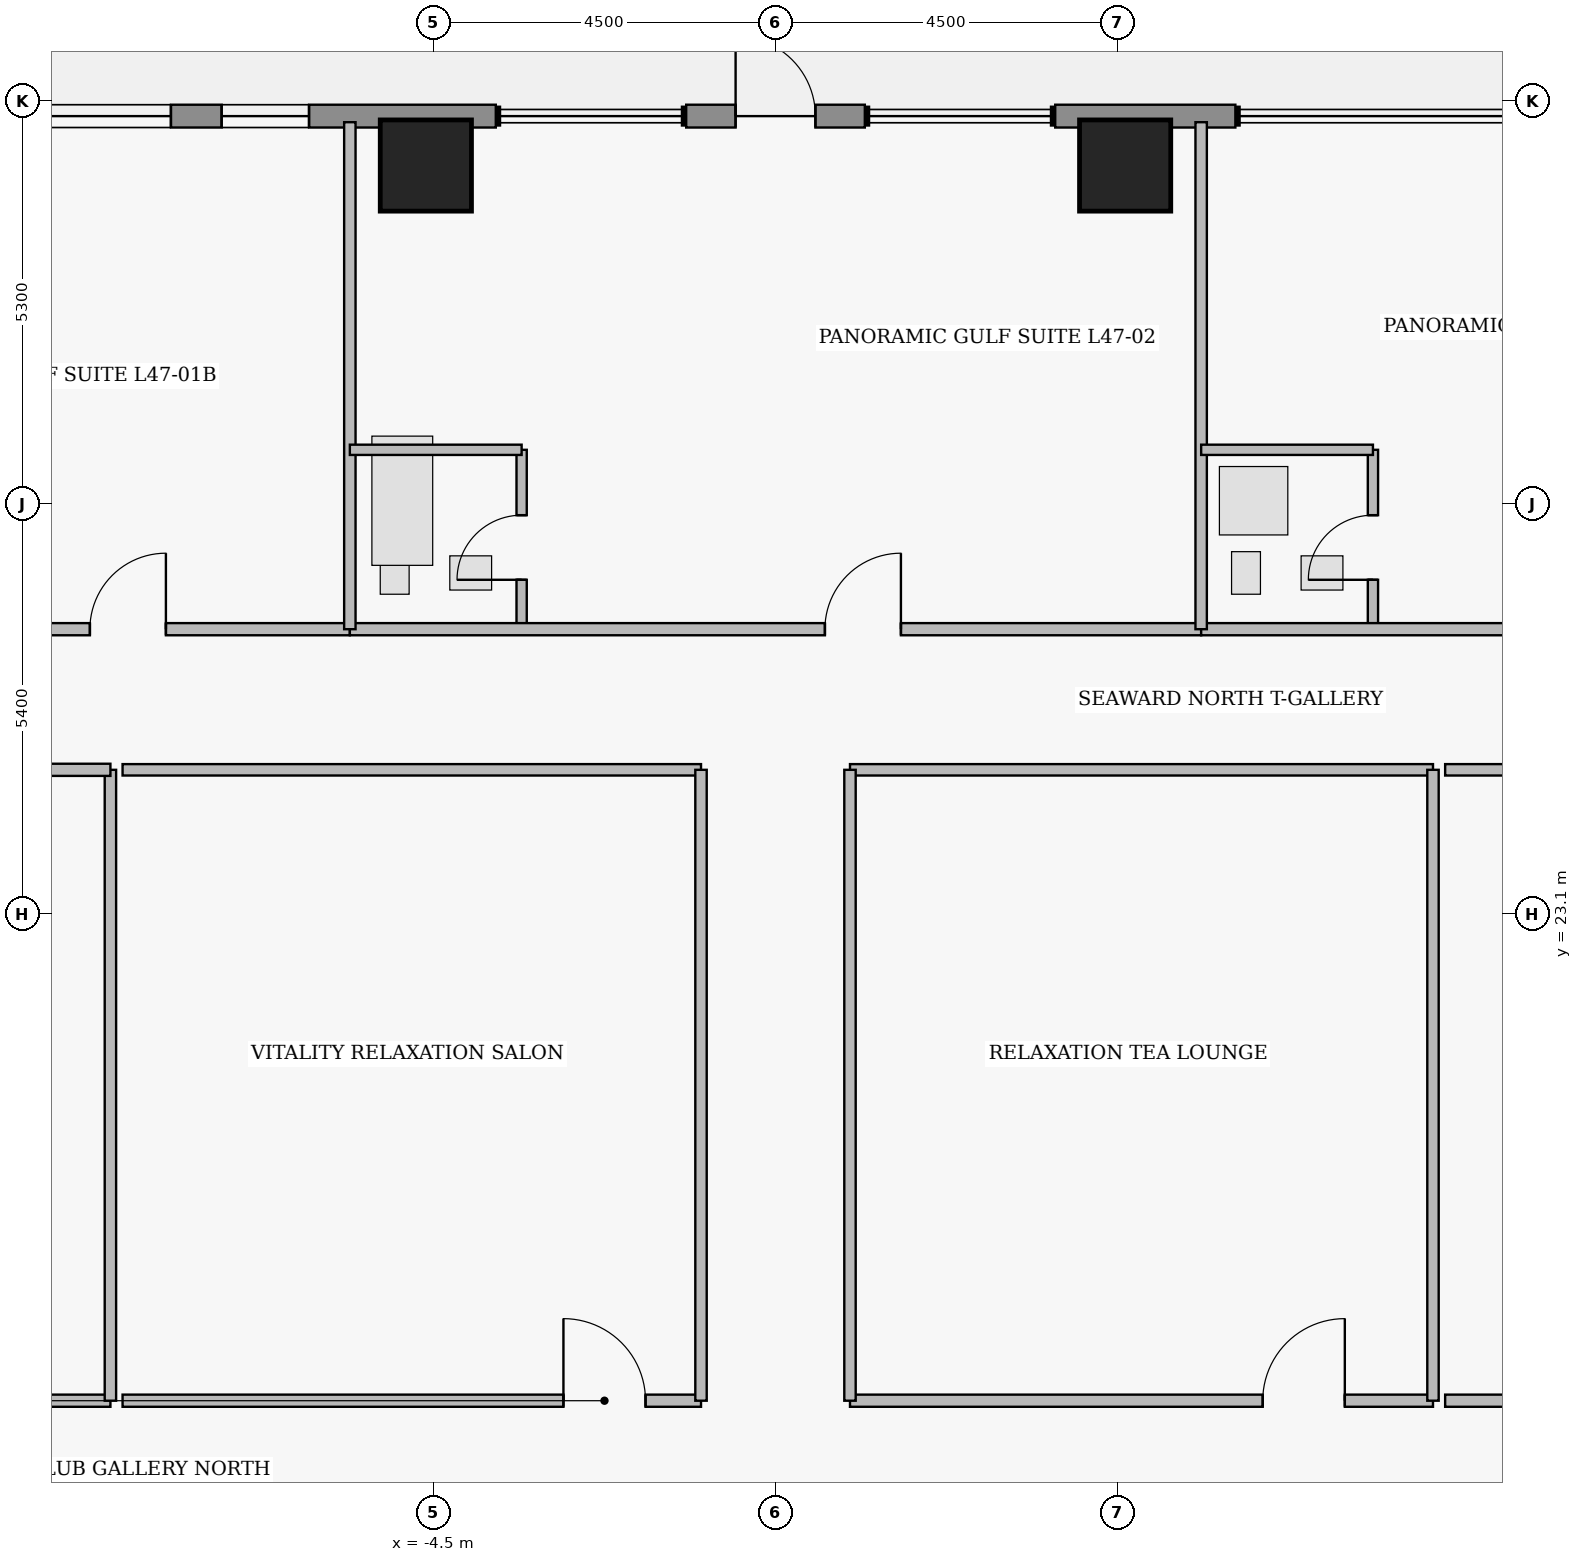
"""IFC4 building model, lengths in metres.
Left out: names, types, materials, properties, quantities, classifications, styles, units other than length and angle.
Written with IfcOpenShell. Run it as: python <this file> out.ifc"""

import sys

from ifc_helpers import new_model, si_unit, direction, frame, frame_2d, origin, origin_2d, place, context, subcontext, project, spatial, rectangle, extrude, element, fill, save


model = new_model("IFC4")
c1 = context("Model", 3, precision=1e-05, world=origin(), true_north=direction((0.0, 1.0)))
c2 = subcontext(c1, "Body", "Model", "MODEL_VIEW")
j1 = project(units=[si_unit("LENGTHUNIT", "METRE"), si_unit("PLANEANGLEUNIT", "RADIAN")], contexts=[c1])
p1 = place(None, origin())
s1 = spatial("IfcSite", under=j1, at=p1, CompositionType="ELEMENT")
p2 = place(p1, origin())
s2 = spatial("IfcBuilding", under=s1, at=p2, CompositionType="ELEMENT")
p3 = place(p2, frame((0.0, 0.0, 188.65)))
s3 = spatial("IfcBuildingStorey", under=s2, at=p3, CompositionType="ELEMENT", Elevation=188.65)
for number, where, z_axis, x_axis in (
    (1, (-4.6, 32.95, 0.0), (0.0, 0.0, 1.0), (1.0, 0.0, 0.0)),
    (2, (4.6, 32.95, 0.0), (0.0, 0.0, 1.0), (1.0, 0.0, 0.0)),
):
    element("IfcColumn", number, at=place(p3, frame(where, z_axis=z_axis, x_axis=x_axis)), inside=s3, PredefinedType="COLUMN", context=c2, shape_type="SweptSolid", body=[
        extrude(rectangle(XDim=1.2, YDim=1.2, at=origin_2d()), origin(), (0.0, 0.0, 1.0), 3.75),
    ])
p4 = place(p3, frame((-10.104, 33.6, 0.0), z_axis=(0.0, 0.0, 1.0), x_axis=(1.0, 0.0, 0.0)))
e3 = element("IfcWall", 3, at=p4, inside=s3, PredefinedType="STANDARD", context=c2, shape_type="SweptSolid", body=[
    extrude(rectangle(XDim=6.424, YDim=0.3, at=frame_2d((3.212, 0.0))), origin(), (0.0, 0.0, 1.0), 3.53),
])
p5 = place(p4, frame((0.55, 0.0, 0.85)))
e4 = element("IfcOpeningElement", 4, at=p5, cuts=e3, PredefinedType="OPENING", context=c2, shape_type="SweptSolid", body=[
    extrude(rectangle(XDim=1.6, YDim=1.8, at=frame_2d((0.8, 0.9))), frame((0.0, 0.16, 0.0), z_axis=(0.0, -1.0, 0.0), x_axis=(1.0, 0.0, 0.0)), (0.0, 0.0, 1.0), 0.32),
])
p6 = place(p4, frame((2.817, 0.0, 0.95)))
e5 = element("IfcOpeningElement", 5, at=p6, cuts=e3, PredefinedType="OPENING", context=c2, shape_type="SweptSolid", body=[
    extrude(rectangle(XDim=1.15, YDim=1.55, at=frame_2d((0.575, 0.775))), frame((0.0, 0.16, 0.0), z_axis=(0.0, -1.0, 0.0), x_axis=(1.0, 0.0, 0.0)), (0.0, 0.0, 1.0), 0.32),
])
p7 = place(p3, frame((-1.175, 33.6, 0.0), z_axis=(0.0, 0.0, 1.0), x_axis=(1.0, 0.0, 0.0)))
e6 = element("IfcWall", 6, at=p7, inside=s3, PredefinedType="STANDARD", context=c2, shape_type="SweptSolid", body=[
    extrude(rectangle(XDim=2.35, YDim=0.3, at=frame_2d((1.175, 0.0))), origin(), (0.0, 0.0, 1.0), 3.53),
])
p8 = place(p7, frame((0.65, 0.0, 0.0)))
e7 = element("IfcOpeningElement", 7, at=p8, cuts=e6, PredefinedType="OPENING", context=c2, shape_type="SweptSolid", body=[
    extrude(rectangle(XDim=1.05, YDim=2.2, at=frame_2d((0.525, 1.1))), frame((0.0, 0.16, 0.0), z_axis=(0.0, -1.0, 0.0), x_axis=(1.0, 0.0, 0.0)), (0.0, 0.0, 1.0), 0.32),
])
p9 = place(p3, frame((3.68, 33.6, 0.0), z_axis=(0.0, 0.0, 1.0), x_axis=(1.0, 0.0, 0.0)))
e8 = element("IfcWall", 8, at=p9, inside=s3, PredefinedType="STANDARD", context=c2, shape_type="SweptSolid", body=[
    extrude(rectangle(XDim=2.37, YDim=0.3, at=frame_2d((1.185, 0.0))), origin(), (0.0, 0.0, 1.0), 3.53),
])
p10 = place(p3, frame((-13.74, 26.85, 0.0), z_axis=(0.0, 0.0, 1.0), x_axis=(1.0, 0.0, 0.0)))
e9 = element("IfcWall", 9, at=p10, inside=s3, PredefinedType="PARTITIONING", context=c2, shape_type="SweptSolid", body=[
    extrude(rectangle(XDim=8.14, YDim=0.16, at=frame_2d((4.07, 0.0))), origin(), (0.0, 0.0, 1.0), 3.53),
])
p11 = place(p10, frame((4.72, 0.0, 0.0)))
e10 = element("IfcOpeningElement", 10, at=p11, cuts=e9, PredefinedType="OPENING", context=c2, shape_type="SweptSolid", body=[
    extrude(rectangle(XDim=1.0, YDim=2.15, at=frame_2d((0.5, 1.075))), frame((0.0, 0.09, 0.0), z_axis=(0.0, -1.0, 0.0), x_axis=(1.0, 0.0, 0.0)), (0.0, 0.0, 1.0), 0.18),
])
p12 = place(p3, frame((-3.34, 26.85, 0.0), z_axis=(0.0, 0.0, 1.0), x_axis=(0.0, 1.0, 0.0)))
e11 = element("IfcWall", 11, at=p12, inside=s3, PredefinedType="PLUMBINGWALL", context=c2, shape_type="SweptSolid", body=[
    extrude(rectangle(XDim=2.36, YDim=0.135, at=frame_2d((1.18, 0.0))), origin(), (0.0, 0.0, 1.0), 3.53),
])
p13 = place(p12, frame((0.65, 0.0, 0.0)))
e12 = element("IfcOpeningElement", 12, at=p13, cuts=e11, PredefinedType="OPENING", context=c2, shape_type="SweptSolid", body=[
    extrude(rectangle(XDim=0.85, YDim=2.1, at=frame_2d((0.425, 1.05))), frame((0.0, 0.077, 0.0), z_axis=(0.0, -1.0, 0.0), x_axis=(1.0, 0.0, 0.0)), (0.0, 0.0, 1.0), 0.155),
])
p14 = place(p3, frame((-5.6, 26.85, 0.0), z_axis=(0.0, 0.0, 1.0), x_axis=(1.0, 0.0, 0.0)))
e13 = element("IfcWall", 13, at=p14, inside=s3, PredefinedType="PARTITIONING", context=c2, shape_type="SweptSolid", body=[
    extrude(rectangle(XDim=11.2, YDim=0.16, at=frame_2d((5.6, 0.0))), origin(), (0.0, 0.0, 1.0), 3.53),
])
p15 = place(p14, frame((6.25, 0.0, 0.0)))
e14 = element("IfcOpeningElement", 14, at=p15, cuts=e13, PredefinedType="OPENING", context=c2, shape_type="SweptSolid", body=[
    extrude(rectangle(XDim=1.0, YDim=2.15, at=frame_2d((0.5, 1.075))), frame((0.0, 0.09, 0.0), z_axis=(0.0, -1.0, 0.0), x_axis=(1.0, 0.0, 0.0)), (0.0, 0.0, 1.0), 0.18),
])
p16 = place(p3, frame((7.86, 26.85, 0.0), z_axis=(0.0, 0.0, 1.0), x_axis=(0.0, 1.0, 0.0)))
e15 = element("IfcWall", 15, at=p16, inside=s3, PredefinedType="PLUMBINGWALL", context=c2, shape_type="SweptSolid", body=[
    extrude(rectangle(XDim=2.36, YDim=0.135, at=frame_2d((1.18, 0.0))), origin(), (0.0, 0.0, 1.0), 3.53),
])
p17 = place(p16, frame((0.65, 0.0, 0.0)))
e16 = element("IfcOpeningElement", 16, at=p17, cuts=e15, PredefinedType="OPENING", context=c2, shape_type="SweptSolid", body=[
    extrude(rectangle(XDim=0.85, YDim=2.1, at=frame_2d((0.425, 1.05))), frame((0.0, 0.077, 0.0), z_axis=(0.0, -1.0, 0.0), x_axis=(1.0, 0.0, 0.0)), (0.0, 0.0, 1.0), 0.155),
])
p18 = place(p3, frame((5.6, 26.85, 0.0), z_axis=(0.0, 0.0, 1.0), x_axis=(1.0, 0.0, 0.0)))
e17 = element("IfcWall", 17, at=p18, inside=s3, PredefinedType="PARTITIONING", context=c2, shape_type="SweptSolid", body=[
    extrude(rectangle(XDim=8.14, YDim=0.16, at=frame_2d((4.07, 0.0))), origin(), (0.0, 0.0, 1.0), 3.53),
])
p19 = place(p18, frame((4.72, 0.0, 0.0)))
e18 = element("IfcOpeningElement", 18, at=p19, cuts=e17, PredefinedType="OPENING", context=c2, shape_type="SweptSolid", body=[
    extrude(rectangle(XDim=1.0, YDim=2.15, at=frame_2d((0.5, 1.075))), frame((0.0, 0.09, 0.0), z_axis=(0.0, -1.0, 0.0), x_axis=(1.0, 0.0, 0.0)), (0.0, 0.0, 1.0), 0.18),
])
p20 = place(p3, frame((-22.04, 16.7, 0.0), z_axis=(0.0, 0.0, 1.0), x_axis=(1.0, 0.0, 0.0)))
e19 = element("IfcWall", 19, at=p20, inside=s3, PredefinedType="PARTITIONING", context=c2, shape_type="SweptSolid", body=[
    extrude(rectangle(XDim=13.29, YDim=0.16, at=frame_2d((6.645, 0.0))), origin(), (0.0, 0.0, 1.0), 3.124),
])
p21 = place(p20, frame((7.39, 0.0, 0.0)))
e20 = element("IfcOpeningElement", 20, at=p21, cuts=e19, PredefinedType="OPENING", context=c2, shape_type="SweptSolid", body=[
    extrude(rectangle(XDim=1.0, YDim=2.15, at=frame_2d((0.5, 1.075))), frame((0.0, 0.09, 0.0), z_axis=(0.0, -1.0, 0.0), x_axis=(1.0, 0.0, 0.0)), (0.0, 0.0, 1.0), 0.18),
])
p22 = place(p3, frame((-8.59, 16.7, 0.0), z_axis=(0.0, 0.0, 1.0), x_axis=(1.0, 0.0, 0.0)))
e21 = element("IfcWall", 21, at=p22, inside=s3, PredefinedType="PARTITIONING", context=c2, shape_type="SweptSolid", body=[
    extrude(rectangle(XDim=7.61, YDim=0.16, at=frame_2d((3.805, 0.0))), origin(), (0.0, 0.0, 1.0), 3.124),
])
p23 = place(p22, frame((5.8, 0.0, 0.0)))
e22 = element("IfcOpeningElement", 22, at=p23, cuts=e21, PredefinedType="OPENING", context=c2, shape_type="SweptSolid", body=[
    extrude(rectangle(XDim=1.08, YDim=2.18, at=frame_2d((0.54, 1.09))), frame((0.0, 0.09, 0.0), z_axis=(0.0, -1.0, 0.0), x_axis=(1.0, 0.0, 0.0)), (0.0, 0.0, 1.0), 0.18),
])
p24 = place(p3, frame((0.98, 16.7, 0.0), z_axis=(0.0, 0.0, 1.0), x_axis=(1.0, 0.0, 0.0)))
e23 = element("IfcWall", 23, at=p24, inside=s3, PredefinedType="PARTITIONING", context=c2, shape_type="SweptSolid", body=[
    extrude(rectangle(XDim=7.67, YDim=0.16, at=frame_2d((3.835, 0.0))), origin(), (0.0, 0.0, 1.0), 3.124),
])
p25 = place(p24, frame((5.43, 0.0, 0.0)))
e24 = element("IfcOpeningElement", 24, at=p25, cuts=e23, PredefinedType="OPENING", context=c2, shape_type="SweptSolid", body=[
    extrude(rectangle(XDim=1.08, YDim=2.18, at=frame_2d((0.54, 1.09))), frame((0.0, 0.09, 0.0), z_axis=(0.0, -1.0, 0.0), x_axis=(1.0, 0.0, 0.0)), (0.0, 0.0, 1.0), 0.18),
])
p26 = place(p3, frame((8.81, 16.7, 0.0), z_axis=(0.0, 0.0, 1.0), x_axis=(1.0, 0.0, 0.0)))
e25 = element("IfcWall", 25, at=p26, inside=s3, PredefinedType="PARTITIONING", context=c2, shape_type="SweptSolid", body=[
    extrude(rectangle(XDim=9.74, YDim=0.16, at=frame_2d((4.87, 0.0))), origin(), (0.0, 0.0, 1.0), 3.124),
])
p27 = place(p26, frame((6.8, 0.0, 0.0)))
e26 = element("IfcOpeningElement", 26, at=p27, cuts=e25, PredefinedType="OPENING", context=c2, shape_type="SweptSolid", body=[
    extrude(rectangle(XDim=1.08, YDim=2.18, at=frame_2d((0.54, 1.09))), frame((0.0, 0.09, 0.0), z_axis=(0.0, -1.0, 0.0), x_axis=(1.0, 0.0, 0.0)), (0.0, 0.0, 1.0), 0.18),
])
p28 = place(p3, frame((-5.6, 26.85, 0.0), z_axis=(0.0, 0.0, 1.0), x_axis=(0.0, 1.0, 0.0)))
e27 = element("IfcWall", 27, at=p28, inside=s3, PredefinedType="PARTITIONING", context=c2, shape_type="SweptSolid", body=[
    extrude(rectangle(XDim=6.67, YDim=0.15, at=frame_2d((3.335, 0.0))), origin(), (0.0, 0.0, 1.0), 3.53),
])
p29 = place(p3, frame((-5.6, 29.21, 0.0), z_axis=(0.0, 0.0, 1.0), x_axis=(1.0, 0.0, 0.0)))
e28 = element("IfcWall", 28, at=p29, inside=s3, PredefinedType="PLUMBINGWALL", context=c2, shape_type="SweptSolid", body=[
    extrude(rectangle(XDim=2.26, YDim=0.135, at=frame_2d((1.13, 0.0))), origin(), (0.0, 0.0, 1.0), 3.53),
])
p30 = place(p3, frame((5.6, 26.85, 0.0), z_axis=(0.0, 0.0, 1.0), x_axis=(0.0, 1.0, 0.0)))
e29 = element("IfcWall", 29, at=p30, inside=s3, PredefinedType="PARTITIONING", context=c2, shape_type="SweptSolid", body=[
    extrude(rectangle(XDim=6.67, YDim=0.15, at=frame_2d((3.335, 0.0))), origin(), (0.0, 0.0, 1.0), 3.53),
])
p31 = place(p3, frame((5.6, 29.21, 0.0), z_axis=(0.0, 0.0, 1.0), x_axis=(1.0, 0.0, 0.0)))
e30 = element("IfcWall", 30, at=p31, inside=s3, PredefinedType="PLUMBINGWALL", context=c2, shape_type="SweptSolid", body=[
    extrude(rectangle(XDim=2.26, YDim=0.135, at=frame_2d((1.13, 0.0))), origin(), (0.0, 0.0, 1.0), 3.53),
])
p32 = place(p3, frame((-8.75, 16.7, 0.0), z_axis=(0.0, 0.0, 1.0), x_axis=(0.0, 1.0, 0.0)))
e31 = element("IfcWall", 31, at=p32, inside=s3, PredefinedType="PARTITIONING", context=c2, shape_type="SweptSolid", body=[
    extrude(rectangle(XDim=8.3, YDim=0.15, at=frame_2d((4.15, 0.0))), origin(), (0.0, 0.0, 1.0), 3.53),
])
p33 = place(p3, frame((-22.04, 25.0, 0.0), z_axis=(0.0, 0.0, 1.0), x_axis=(1.0, 0.0, 0.0)))
e32 = element("IfcWall", 32, at=p33, inside=s3, PredefinedType="PARTITIONING", context=c2, shape_type="SweptSolid", body=[
    extrude(rectangle(XDim=13.29, YDim=0.16, at=frame_2d((6.645, 0.0))), origin(), (0.0, 0.0, 1.0), 3.124),
])
p34 = place(p3, frame((-8.59, 25.0, 0.0), z_axis=(0.0, 0.0, 1.0), x_axis=(1.0, 0.0, 0.0)))
e33 = element("IfcWall", 33, at=p34, inside=s3, PredefinedType="PARTITIONING", context=c2, shape_type="SweptSolid", body=[
    extrude(rectangle(XDim=7.61, YDim=0.15, at=frame_2d((3.805, 0.0))), origin(), (0.0, 0.0, 1.0), 3.124),
])
p35 = place(p3, frame((-0.98, 16.7, 0.0), z_axis=(0.0, 0.0, 1.0), x_axis=(0.0, 1.0, 0.0)))
e34 = element("IfcWall", 34, at=p35, inside=s3, PredefinedType="PARTITIONING", context=c2, shape_type="SweptSolid", body=[
    extrude(rectangle(XDim=8.3, YDim=0.15, at=frame_2d((4.15, 0.0))), origin(), (0.0, 0.0, 1.0), 3.53),
])
p36 = place(p3, frame((0.98, 25.0, 0.0), z_axis=(0.0, 0.0, 1.0), x_axis=(1.0, 0.0, 0.0)))
e35 = element("IfcWall", 35, at=p36, inside=s3, PredefinedType="PARTITIONING", context=c2, shape_type="SweptSolid", body=[
    extrude(rectangle(XDim=7.67, YDim=0.15, at=frame_2d((3.835, 0.0))), origin(), (0.0, 0.0, 1.0), 3.124),
])
for number, where, z_axis, x_axis in (
    (36, (0.98, 16.7, 0.0), (0.0, 0.0, 1.0), (0.0, 1.0, 0.0)),
    (37, (8.65, 16.7, 0.0), (0.0, 0.0, 1.0), (0.0, 1.0, 0.0)),
):
    element("IfcWall", number, at=place(p3, frame(where, z_axis=z_axis, x_axis=x_axis)), inside=s3, PredefinedType="PARTITIONING", context=c2, shape_type="SweptSolid", body=[
        extrude(rectangle(XDim=8.3, YDim=0.15, at=frame_2d((4.15, 0.0))), origin(), (0.0, 0.0, 1.0), 3.53),
    ])
p37 = place(p3, frame((8.81, 25.0, 0.0), z_axis=(0.0, 0.0, 1.0), x_axis=(1.0, 0.0, 0.0)))
e38 = element("IfcWall", 38, at=p37, inside=s3, PredefinedType="PARTITIONING", context=c2, shape_type="SweptSolid", body=[
    extrude(rectangle(XDim=9.74, YDim=0.15, at=frame_2d((4.87, 0.0))), origin(), (0.0, 0.0, 1.0), 3.124),
])
p38 = place(p5, origin())
e39 = element("IfcWindow", 39, at=p38, inside=s3, PartitioningType="SINGLE_PANEL", PredefinedType="WINDOW", context=c2, shape_type="SweptSolid", body=[
    extrude(rectangle(XDim=1.6, YDim=1.8, at=frame_2d((0.8, 0.9))), frame((0.0, 0.03, 0.0), z_axis=(0.0, -1.0, 0.0), x_axis=(1.0, 0.0, 0.0)), (0.0, 0.0, 1.0), 0.06),
])
fill(e4, e39)
p39 = place(p6, origin())
e40 = element("IfcWindow", 40, at=p39, inside=s3, PartitioningType="SINGLE_PANEL", PredefinedType="WINDOW", context=c2, shape_type="SweptSolid", body=[
    extrude(rectangle(XDim=1.15, YDim=1.55, at=frame_2d((0.575, 0.775))), frame((0.0, 0.03, 0.0), z_axis=(0.0, -1.0, 0.0), x_axis=(1.0, 0.0, 0.0)), (0.0, 0.0, 1.0), 0.06),
])
fill(e5, e40)
p40 = place(p8, origin())
e41 = element("IfcDoor", 41, at=p40, inside=s3, OperationType="SINGLE_SWING_LEFT", PredefinedType="DOOR", context=c2, shape_type="SweptSolid", body=[
    extrude(rectangle(XDim=1.05, YDim=2.2, at=frame_2d((0.525, 1.1))), frame((0.0, 0.025, 0.0), z_axis=(0.0, -1.0, 0.0), x_axis=(1.0, 0.0, 0.0)), (0.0, 0.0, 1.0), 0.05),
])
fill(e7, e41)
p41 = place(p11, origin())
e42 = element("IfcDoor", 42, at=p41, inside=s3, OperationType="SINGLE_SWING_RIGHT", PredefinedType="DOOR", context=c2, shape_type="SweptSolid", body=[
    extrude(rectangle(XDim=1.0, YDim=2.15, at=frame_2d((0.5, 1.075))), frame((0.0, 0.025, 0.0), z_axis=(0.0, -1.0, 0.0), x_axis=(1.0, 0.0, 0.0)), (0.0, 0.0, 1.0), 0.05),
])
fill(e10, e42)
p42 = place(p13, origin())
e43 = element("IfcDoor", 43, at=p42, inside=s3, OperationType="SINGLE_SWING_LEFT", PredefinedType="DOOR", context=c2, shape_type="SweptSolid", body=[
    extrude(rectangle(XDim=0.85, YDim=2.1, at=frame_2d((0.425, 1.05))), frame((0.0, 0.025, 0.0), z_axis=(0.0, -1.0, 0.0), x_axis=(1.0, 0.0, 0.0)), (0.0, 0.0, 1.0), 0.05),
])
fill(e12, e43)
p43 = place(p15, origin())
e44 = element("IfcDoor", 44, at=p43, inside=s3, OperationType="SINGLE_SWING_RIGHT", PredefinedType="DOOR", context=c2, shape_type="SweptSolid", body=[
    extrude(rectangle(XDim=1.0, YDim=2.15, at=frame_2d((0.5, 1.075))), frame((0.0, 0.025, 0.0), z_axis=(0.0, -1.0, 0.0), x_axis=(1.0, 0.0, 0.0)), (0.0, 0.0, 1.0), 0.05),
])
fill(e14, e44)
p44 = place(p17, origin())
e45 = element("IfcDoor", 45, at=p44, inside=s3, OperationType="SINGLE_SWING_LEFT", PredefinedType="DOOR", context=c2, shape_type="SweptSolid", body=[
    extrude(rectangle(XDim=0.85, YDim=2.1, at=frame_2d((0.425, 1.05))), frame((0.0, 0.025, 0.0), z_axis=(0.0, -1.0, 0.0), x_axis=(1.0, 0.0, 0.0)), (0.0, 0.0, 1.0), 0.05),
])
fill(e16, e45)
p45 = place(p23, origin())
e46 = element("IfcDoor", 46, at=p45, inside=s3, OperationType="SINGLE_SWING_LEFT", PredefinedType="DOOR", context=c2, shape_type="SweptSolid", body=[
    extrude(rectangle(XDim=1.08, YDim=2.18, at=frame_2d((0.54, 1.09))), frame((0.0, 0.025, 0.0), z_axis=(0.0, -1.0, 0.0), x_axis=(1.0, 0.0, 0.0)), (0.0, 0.0, 1.0), 0.05),
])
fill(e22, e46)
p46 = place(p25, origin())
e47 = element("IfcDoor", 47, at=p46, inside=s3, OperationType="SINGLE_SWING_RIGHT", PredefinedType="DOOR", context=c2, shape_type="SweptSolid", body=[
    extrude(rectangle(XDim=1.08, YDim=2.18, at=frame_2d((0.54, 1.09))), frame((0.0, 0.025, 0.0), z_axis=(0.0, -1.0, 0.0), x_axis=(1.0, 0.0, 0.0)), (0.0, 0.0, 1.0), 0.05),
])
fill(e24, e47)
save(model, sys.argv[1])
